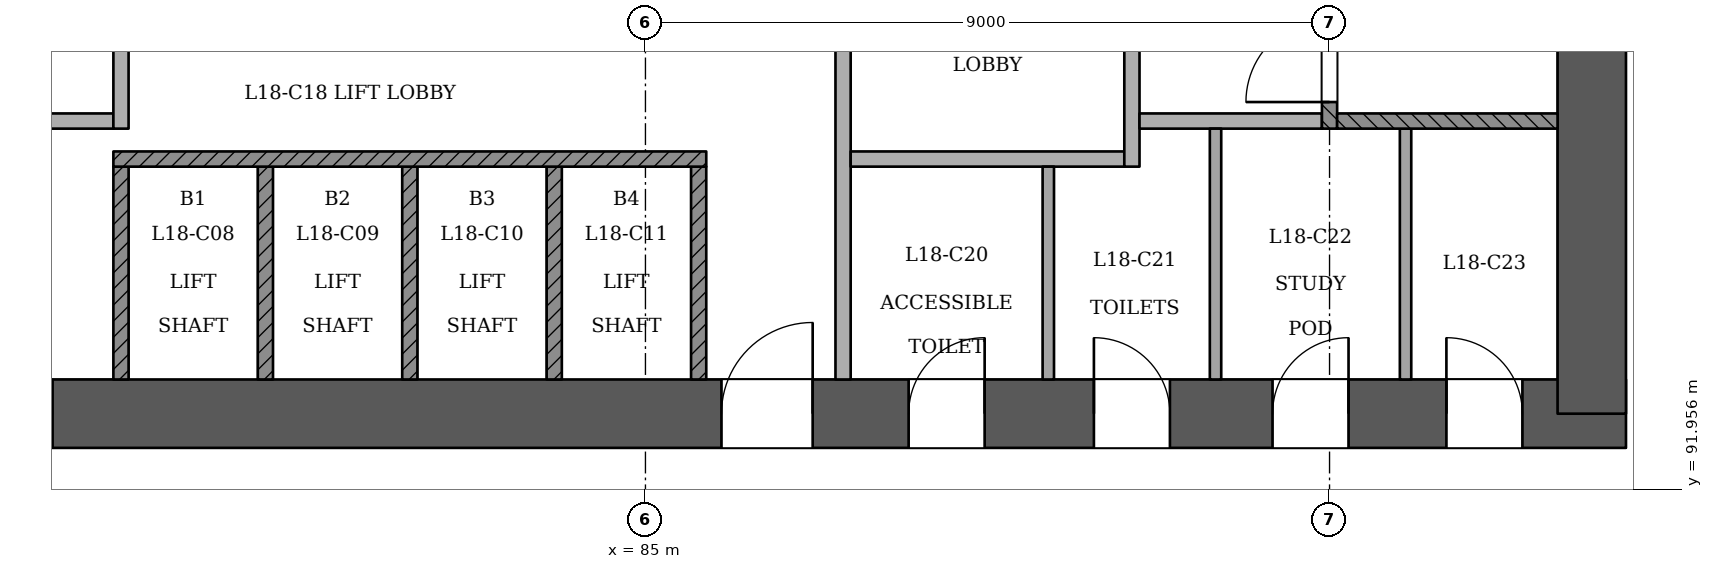
"""IFC4 building model, lengths in metres.
Left out: names, types, materials, properties, quantities, classifications, styles, units other than length and angle.
Written with IfcOpenShell. Run it as: python <this file> out.ifc"""

import sys

from ifc_helpers import new_model, si_unit, direction, frame, frame_2d, origin, place, context, subcontext, project, spatial, rectangle, extrude, element, fill, save


model = new_model("IFC4")
c1 = context("Model", 3, precision=1e-05, world=origin(), true_north=direction((0.0, 1.0)))
c2 = subcontext(c1, "Body", "Model", "MODEL_VIEW")
j1 = project(units=[si_unit("LENGTHUNIT", "METRE"), si_unit("PLANEANGLEUNIT", "RADIAN")], contexts=[c1])
p1 = place(None, origin())
s1 = spatial("IfcSite", under=j1, at=p1, CompositionType="ELEMENT")
p2 = place(p1, origin())
s2 = spatial("IfcBuilding", under=s1, at=p2, CompositionType="ELEMENT")
p3 = place(p2, frame((0.0, 0.0, 73.8)))
s3 = spatial("IfcBuildingStorey", under=s2, at=p3, CompositionType="ELEMENT", Elevation=73.8)
p4 = place(p3, frame((72.55, 92.95, 0.0), z_axis=(0.0, 0.0, 1.0), x_axis=(1.0, 0.0, 0.0)))
e1 = element("IfcWall", 1, at=p4, inside=s3, PredefinedType="SHEAR", context=c2, shape_type="SweptSolid", body=[
    extrude(rectangle(XDim=25.35, YDim=0.9, at=frame_2d((12.675, 0.0))), origin(), (0.0, 0.0, 1.0), 3.6),
])
p5 = place(p4, frame((1.25, 0.0, 0.0)))
e2 = element("IfcOpeningElement", 2, at=p5, cuts=e1, PredefinedType="OPENING", context=c2, shape_type="SweptSolid", body=[
    extrude(rectangle(XDim=1.2, YDim=2.1, at=frame_2d((0.6, 1.05))), frame((0.0, 0.46, 0.0), z_axis=(0.0, -1.0, 0.0), x_axis=(1.0, 0.0, 0.0)), (0.0, 0.0, 1.0), 0.921),
])
p6 = place(p4, frame((3.45, 0.0, 0.0)))
e3 = element("IfcOpeningElement", 3, at=p6, cuts=e1, PredefinedType="OPENING", context=c2, shape_type="SweptSolid", body=[
    extrude(rectangle(XDim=1.2, YDim=2.1, at=frame_2d((0.6, 1.05))), frame((0.0, 0.46, 0.0), z_axis=(0.0, -1.0, 0.0), x_axis=(1.0, 0.0, 0.0)), (0.0, 0.0, 1.0), 0.921),
])
p7 = place(p4, frame((13.45, 0.0, 0.0)))
e4 = element("IfcOpeningElement", 4, at=p7, cuts=e1, PredefinedType="OPENING", context=c2, shape_type="SweptSolid", body=[
    extrude(rectangle(XDim=1.2, YDim=2.1, at=frame_2d((0.6, 1.05))), frame((0.0, 0.46, 0.0), z_axis=(0.0, -1.0, 0.0), x_axis=(1.0, 0.0, 0.0)), (0.0, 0.0, 1.0), 0.921),
])
p8 = place(p4, frame((15.913, 0.0, 0.0)))
e5 = element("IfcOpeningElement", 5, at=p8, cuts=e1, PredefinedType="OPENING", context=c2, shape_type="SweptSolid", body=[
    extrude(rectangle(XDim=1.0, YDim=2.1, at=frame_2d((0.5, 1.05))), frame((0.0, 0.46, 0.0), z_axis=(0.0, -1.0, 0.0), x_axis=(1.0, 0.0, 0.0)), (0.0, 0.0, 1.0), 0.921),
])
p9 = place(p4, frame((18.35, 0.0, 0.0)))
e6 = element("IfcOpeningElement", 6, at=p9, cuts=e1, PredefinedType="OPENING", context=c2, shape_type="SweptSolid", body=[
    extrude(rectangle(XDim=1.0, YDim=2.1, at=frame_2d((0.5, 1.05))), frame((0.0, 0.46, 0.0), z_axis=(0.0, -1.0, 0.0), x_axis=(1.0, 0.0, 0.0)), (0.0, 0.0, 1.0), 0.921),
])
p10 = place(p4, frame((20.7, 0.0, 0.0)))
e7 = element("IfcOpeningElement", 7, at=p10, cuts=e1, PredefinedType="OPENING", context=c2, shape_type="SweptSolid", body=[
    extrude(rectangle(XDim=1.0, YDim=2.1, at=frame_2d((0.5, 1.05))), frame((0.0, 0.46, 0.0), z_axis=(0.0, -1.0, 0.0), x_axis=(1.0, 0.0, 0.0)), (0.0, 0.0, 1.0), 0.921),
])
p11 = place(p4, frame((22.988, 0.0, 0.0)))
e8 = element("IfcOpeningElement", 8, at=p11, cuts=e1, PredefinedType="OPENING", context=c2, shape_type="SweptSolid", body=[
    extrude(rectangle(XDim=1.0, YDim=2.1, at=frame_2d((0.5, 1.05))), frame((0.0, 0.46, 0.0), z_axis=(0.0, -1.0, 0.0), x_axis=(1.0, 0.0, 0.0)), (0.0, 0.0, 1.0), 0.921),
])
p12 = place(p3, frame((97.45, 92.95, 0.0), z_axis=(0.0, 0.0, 1.0), x_axis=(0.0, 1.0, 0.0)))
e9 = element("IfcWall", 9, at=p12, inside=s3, PredefinedType="SHEAR", context=c2, shape_type="SweptSolid", body=[
    extrude(rectangle(XDim=11.35, YDim=0.9, at=frame_2d((5.675, 0.0))), origin(), (0.0, 0.0, 1.0), 3.6),
])
p13 = place(p3, frame((85.747, 59.896, 0.0), z_axis=(0.0, 0.0, 1.0), x_axis=(0.500002549277, 0.866023931954, 0.0)))
e10 = element("IfcWall", 10, at=p13, inside=s3, PredefinedType="PARTITIONING", context=c2, shape_type="SweptSolid", body=[
    extrude(rectangle(XDim=43.082, YDim=0.15, at=frame_2d((21.541, 0.0))), origin(), (0.0, 0.0, 1.0), 2.7),
])
p14 = place(p13, frame((0.244, 0.0, 0.0)))
e11 = element("IfcOpeningElement", 11, at=p14, cuts=e10, PredefinedType="OPENING", context=c2, shape_type="SweptSolid", body=[
    extrude(rectangle(XDim=1.2, YDim=2.1, at=frame_2d((0.6, 1.05))), frame((0.0, 0.085, 0.0), z_axis=(0.0, -1.0, 0.0), x_axis=(1.0, 0.0, 0.0)), (0.0, 0.0, 1.0), 0.171),
])
p15 = place(p13, frame((4.146, 0.0, 0.0)))
e12 = element("IfcOpeningElement", 12, at=p15, cuts=e10, PredefinedType="OPENING", context=c2, shape_type="SweptSolid", body=[
    extrude(rectangle(XDim=1.0, YDim=2.1, at=frame_2d((0.5, 1.05))), frame((0.0, 0.085, 0.0), z_axis=(0.0, -1.0, 0.0), x_axis=(1.0, 0.0, 0.0)), (0.0, 0.0, 1.0), 0.171),
])
p16 = place(p13, frame((10.821, 0.0, 0.0)))
e13 = element("IfcOpeningElement", 13, at=p16, cuts=e10, PredefinedType="OPENING", context=c2, shape_type="SweptSolid", body=[
    extrude(rectangle(XDim=1.0, YDim=2.1, at=frame_2d((0.5, 1.05))), frame((0.0, 0.085, 0.0), z_axis=(0.0, -1.0, 0.0), x_axis=(1.0, 0.0, 0.0)), (0.0, 0.0, 1.0), 0.171),
])
p17 = place(p13, frame((13.262, 0.0, 0.0)))
e14 = element("IfcOpeningElement", 14, at=p17, cuts=e10, PredefinedType="OPENING", context=c2, shape_type="SweptSolid", body=[
    extrude(rectangle(XDim=1.0, YDim=2.1, at=frame_2d((0.5, 1.05))), frame((0.0, 0.085, 0.0), z_axis=(0.0, -1.0, 0.0), x_axis=(1.0, 0.0, 0.0)), (0.0, 0.0, 1.0), 0.171),
])
p18 = place(p13, frame((20.941, 0.0, 0.0)))
e15 = element("IfcOpeningElement", 15, at=p18, cuts=e10, PredefinedType="OPENING", context=c2, shape_type="SweptSolid", body=[
    extrude(rectangle(XDim=1.2, YDim=2.1, at=frame_2d((0.6, 1.05))), frame((0.0, 0.085, 0.0), z_axis=(0.0, -1.0, 0.0), x_axis=(1.0, 0.0, 0.0)), (0.0, 0.0, 1.0), 0.171),
])
p19 = place(p13, frame((28.821, 0.0, 0.0)))
e16 = element("IfcOpeningElement", 16, at=p19, cuts=e10, PredefinedType="OPENING", context=c2, shape_type="SweptSolid", body=[
    extrude(rectangle(XDim=1.0, YDim=2.1, at=frame_2d((0.5, 1.05))), frame((0.0, 0.085, 0.0), z_axis=(0.0, -1.0, 0.0), x_axis=(1.0, 0.0, 0.0)), (0.0, 0.0, 1.0), 0.171),
])
p20 = place(p13, frame((31.112, 0.0, 0.0)))
e17 = element("IfcOpeningElement", 17, at=p20, cuts=e10, PredefinedType="OPENING", context=c2, shape_type="SweptSolid", body=[
    extrude(rectangle(XDim=1.1, YDim=2.1, at=frame_2d((0.55, 1.05))), frame((0.0, 0.085, 0.0), z_axis=(0.0, -1.0, 0.0), x_axis=(1.0, 0.0, 0.0)), (0.0, 0.0, 1.0), 0.171),
])
p21 = place(p13, frame((38.514, 0.0, 0.0)))
e18 = element("IfcOpeningElement", 18, at=p21, cuts=e10, PredefinedType="OPENING", context=c2, shape_type="SweptSolid", body=[
    extrude(rectangle(XDim=1.2, YDim=2.1, at=frame_2d((0.6, 1.05))), frame((0.0, 0.085, 0.0), z_axis=(0.0, -1.0, 0.0), x_axis=(1.0, 0.0, 0.0)), (0.0, 0.0, 1.0), 0.171),
])
for number, where, z_axis, x_axis in (
    (19, (78.1, 93.4, 0.0), (0.0, 0.0, 1.0), (0.0, 1.0, 0.0)),
    (20, (80.0, 93.4, 0.0), (0.0, 0.0, 1.0), (0.0, 1.0, 0.0)),
    (21, (81.9, 93.4, 0.0), (0.0, 0.0, 1.0), (0.0, 1.0, 0.0)),
    (22, (83.8, 93.4, 0.0), (0.0, 0.0, 1.0), (0.0, 1.0, 0.0)),
    (23, (85.7, 93.4, 0.0), (0.0, 0.0, 1.0), (0.0, 1.0, 0.0)),
):
    element("IfcWall", number, at=place(p3, frame(where, z_axis=z_axis, x_axis=x_axis)), inside=s3, PredefinedType="SOLIDWALL", context=c2, shape_type="SweptSolid", body=[
        extrude(rectangle(XDim=2.8, YDim=0.2, at=frame_2d((1.4, 0.0))), origin(), (0.0, 0.0, 1.0), 3.1),
    ])
p22 = place(p3, frame((87.6, 93.4, 0.0), z_axis=(0.0, 0.0, 1.0), x_axis=(0.0, 1.0, 0.0)))
e24 = element("IfcWall", 24, at=p22, inside=s3, PredefinedType="PARTITIONING", context=c2, shape_type="SweptSolid", body=[
    extrude(rectangle(XDim=7.0, YDim=0.2, at=frame_2d((3.5, 0.0))), origin(), (0.0, 0.0, 1.0), 3.1),
])
p23 = place(p22, frame((4.45, 0.0, 0.0)))
e25 = element("IfcOpeningElement", 25, at=p23, cuts=e24, PredefinedType="OPENING", context=c2, shape_type="SweptSolid", body=[
    extrude(rectangle(XDim=1.1, YDim=2.1, at=frame_2d((0.55, 1.05))), frame((0.0, 0.11, 0.0), z_axis=(0.0, -1.0, 0.0), x_axis=(1.0, 0.0, 0.0)), (0.0, 0.0, 1.0), 0.221),
])
p24 = place(p3, frame((90.3, 93.4, 0.0), z_axis=(0.0, 0.0, 1.0), x_axis=(0.0, 1.0, 0.0)))
e26 = element("IfcWall", 26, at=p24, inside=s3, PredefinedType="PARTITIONING", context=c2, shape_type="SweptSolid", body=[
    extrude(rectangle(XDim=2.8, YDim=0.15, at=frame_2d((1.4, 0.0))), origin(), (0.0, 0.0, 1.0), 3.1),
])
for number, where, z_axis, x_axis in (
    (27, (92.5, 93.4, 0.0), (0.0, 0.0, 1.0), (0.0, 1.0, 0.0)),
    (28, (95.0, 93.4, 0.0), (0.0, 0.0, 1.0), (0.0, 1.0, 0.0)),
):
    element("IfcWall", number, at=place(p3, frame(where, z_axis=z_axis, x_axis=x_axis)), inside=s3, PredefinedType="PARTITIONING", context=c2, shape_type="SweptSolid", body=[
        extrude(rectangle(XDim=3.3, YDim=0.15, at=frame_2d((1.65, 0.0))), origin(), (0.0, 0.0, 1.0), 3.1),
    ])
p25 = place(p3, frame((78.0, 96.3, 0.0), z_axis=(0.0, 0.0, 1.0), x_axis=(1.0, 0.0, 0.0)))
e29 = element("IfcWall", 29, at=p25, inside=s3, PredefinedType="SOLIDWALL", context=c2, shape_type="SweptSolid", body=[
    extrude(rectangle(XDim=7.8, YDim=0.2, at=frame_2d((3.9, 0.0))), origin(), (0.0, 0.0, 1.0), 3.1),
])
p26 = place(p3, frame((87.7, 96.3, 0.0), z_axis=(0.0, 0.0, 1.0), x_axis=(1.0, 0.0, 0.0)))
e30 = element("IfcWall", 30, at=p26, inside=s3, PredefinedType="PARTITIONING", context=c2, shape_type="SweptSolid", body=[
    extrude(rectangle(XDim=3.6, YDim=0.2, at=frame_2d((1.8, 0.0))), origin(), (0.0, 0.0, 1.0), 3.1),
])
p27 = place(p3, frame((91.4, 96.2, 0.0), z_axis=(0.0, 0.0, 1.0), x_axis=(0.0, 1.0, 0.0)))
e31 = element("IfcWall", 31, at=p27, inside=s3, PredefinedType="PARTITIONING", context=c2, shape_type="SweptSolid", body=[
    extrude(rectangle(XDim=4.2, YDim=0.2, at=frame_2d((2.1, 0.0))), origin(), (0.0, 0.0, 1.0), 3.1),
])
p28 = place(p27, frame((2.45, 0.0, 0.0)))
e32 = element("IfcOpeningElement", 32, at=p28, cuts=e31, PredefinedType="OPENING", context=c2, shape_type="SweptSolid", body=[
    extrude(rectangle(XDim=1.1, YDim=2.1, at=frame_2d((0.55, 1.05))), frame((0.0, 0.11, 0.0), z_axis=(0.0, -1.0, 0.0), x_axis=(1.0, 0.0, 0.0)), (0.0, 0.0, 1.0), 0.221),
])
p29 = place(p3, frame((76.1, 96.8, 0.0), z_axis=(0.0, 0.0, 1.0), x_axis=(1.0, 0.0, 0.0)))
e33 = element("IfcWall", 33, at=p29, inside=s3, PredefinedType="PARTITIONING", context=c2, shape_type="SweptSolid", body=[
    extrude(rectangle(XDim=1.9, YDim=0.2, at=frame_2d((0.95, 0.0))), origin(), (0.0, 0.0, 1.0), 3.1),
])
p30 = place(p3, frame((78.1, 96.7, 0.0), z_axis=(0.0, 0.0, 1.0), x_axis=(0.0, 1.0, 0.0)))
e34 = element("IfcWall", 34, at=p30, inside=s3, PredefinedType="PARTITIONING", context=c2, shape_type="SweptSolid", body=[
    extrude(rectangle(XDim=3.7, YDim=0.2, at=frame_2d((1.85, 0.0))), origin(), (0.0, 0.0, 1.0), 3.1),
])
p31 = place(p30, frame((1.95, 0.0, 0.0)))
e35 = element("IfcOpeningElement", 35, at=p31, cuts=e34, PredefinedType="OPENING", context=c2, shape_type="SweptSolid", body=[
    extrude(rectangle(XDim=1.1, YDim=2.1, at=frame_2d((0.55, 1.05))), frame((0.0, 0.11, 0.0), z_axis=(0.0, -1.0, 0.0), x_axis=(1.0, 0.0, 0.0)), (0.0, 0.0, 1.0), 0.221),
])
p32 = place(p3, frame((91.5, 96.8, 0.0), z_axis=(0.0, 0.0, 1.0), x_axis=(1.0, 0.0, 0.0)))
e36 = element("IfcWall", 36, at=p32, inside=s3, PredefinedType="PARTITIONING", context=c2, shape_type="SweptSolid", body=[
    extrude(rectangle(XDim=2.4, YDim=0.2, at=frame_2d((1.2, 0.0))), origin(), (0.0, 0.0, 1.0), 3.1),
])
p33 = place(p3, frame((94.0, 96.7, 0.0), z_axis=(0.0, 0.0, 1.0), x_axis=(0.0, 1.0, 0.0)))
e37 = element("IfcWall", 37, at=p33, inside=s3, PredefinedType="SOLIDWALL", context=c2, shape_type="SweptSolid", body=[
    extrude(rectangle(XDim=3.7, YDim=0.2, at=frame_2d((1.85, 0.0))), origin(), (0.0, 0.0, 1.0), 3.1),
])
p34 = place(p33, frame((0.35, 0.0, 0.0)))
e38 = element("IfcOpeningElement", 38, at=p34, cuts=e37, PredefinedType="OPENING", context=c2, shape_type="SweptSolid", body=[
    extrude(rectangle(XDim=1.1, YDim=2.1, at=frame_2d((0.55, 1.05))), frame((0.0, 0.11, 0.0), z_axis=(0.0, -1.0, 0.0), x_axis=(1.0, 0.0, 0.0)), (0.0, 0.0, 1.0), 0.221),
])
p35 = place(p3, frame((94.1, 96.8, 0.0), z_axis=(0.0, 0.0, 1.0), x_axis=(1.0, 0.0, 0.0)))
e39 = element("IfcWall", 39, at=p35, inside=s3, PredefinedType="SOLIDWALL", context=c2, shape_type="SweptSolid", body=[
    extrude(rectangle(XDim=2.9, YDim=0.2, at=frame_2d((1.45, 0.0))), origin(), (0.0, 0.0, 1.0), 3.1),
])
p36 = place(p34, origin())
e40 = element("IfcDoor", 40, at=p36, inside=s3, OperationType="SINGLE_SWING_LEFT", PredefinedType="NOTDEFINED", context=c2, shape_type="SweptSolid", body=[
    extrude(rectangle(XDim=1.1, YDim=2.1, at=frame_2d((0.55, 1.05))), frame((0.0, 0.025, 0.0), z_axis=(0.0, -1.0, 0.0), x_axis=(1.0, 0.0, 0.0)), (0.0, 0.0, 1.0), 0.05),
])
fill(e38, e40)
p37 = place(p6, origin())
e41 = element("IfcDoor", 41, at=p37, inside=s3, OperationType="SINGLE_SWING_LEFT", PredefinedType="NOTDEFINED", context=c2, shape_type="SweptSolid", body=[
    extrude(rectangle(XDim=1.2, YDim=2.1, at=frame_2d((0.6, 1.05))), frame((0.0, 0.025, 0.0), z_axis=(0.0, -1.0, 0.0), x_axis=(1.0, 0.0, 0.0)), (0.0, 0.0, 1.0), 0.05),
])
fill(e3, e41)
p38 = place(p7, origin())
e42 = element("IfcDoor", 42, at=p38, inside=s3, OperationType="SINGLE_SWING_RIGHT", PredefinedType="NOTDEFINED", context=c2, shape_type="SweptSolid", body=[
    extrude(rectangle(XDim=1.2, YDim=2.1, at=frame_2d((0.6, 1.05))), frame((0.0, 0.025, 0.0), z_axis=(0.0, -1.0, 0.0), x_axis=(1.0, 0.0, 0.0)), (0.0, 0.0, 1.0), 0.05),
])
fill(e4, e42)
p39 = place(p8, origin())
e43 = element("IfcDoor", 43, at=p39, inside=s3, OperationType="SINGLE_SWING_RIGHT", PredefinedType="NOTDEFINED", context=c2, shape_type="SweptSolid", body=[
    extrude(rectangle(XDim=1.0, YDim=2.1, at=frame_2d((0.5, 1.05))), frame((0.0, 0.025, 0.0), z_axis=(0.0, -1.0, 0.0), x_axis=(1.0, 0.0, 0.0)), (0.0, 0.0, 1.0), 0.05),
])
fill(e5, e43)
p40 = place(p9, origin())
e44 = element("IfcDoor", 44, at=p40, inside=s3, OperationType="SINGLE_SWING_LEFT", PredefinedType="NOTDEFINED", context=c2, shape_type="SweptSolid", body=[
    extrude(rectangle(XDim=1.0, YDim=2.1, at=frame_2d((0.5, 1.05))), frame((0.0, 0.025, 0.0), z_axis=(0.0, -1.0, 0.0), x_axis=(1.0, 0.0, 0.0)), (0.0, 0.0, 1.0), 0.05),
])
fill(e6, e44)
p41 = place(p10, origin())
e45 = element("IfcDoor", 45, at=p41, inside=s3, OperationType="SINGLE_SWING_RIGHT", PredefinedType="NOTDEFINED", context=c2, shape_type="SweptSolid", body=[
    extrude(rectangle(XDim=1.0, YDim=2.1, at=frame_2d((0.5, 1.05))), frame((0.0, 0.025, 0.0), z_axis=(0.0, -1.0, 0.0), x_axis=(1.0, 0.0, 0.0)), (0.0, 0.0, 1.0), 0.05),
])
fill(e7, e45)
p42 = place(p11, origin())
e46 = element("IfcDoor", 46, at=p42, inside=s3, OperationType="SINGLE_SWING_LEFT", PredefinedType="NOTDEFINED", context=c2, shape_type="SweptSolid", body=[
    extrude(rectangle(XDim=1.0, YDim=2.1, at=frame_2d((0.5, 1.05))), frame((0.0, 0.025, 0.0), z_axis=(0.0, -1.0, 0.0), x_axis=(1.0, 0.0, 0.0)), (0.0, 0.0, 1.0), 0.05),
])
fill(e8, e46)
save(model, sys.argv[1])
